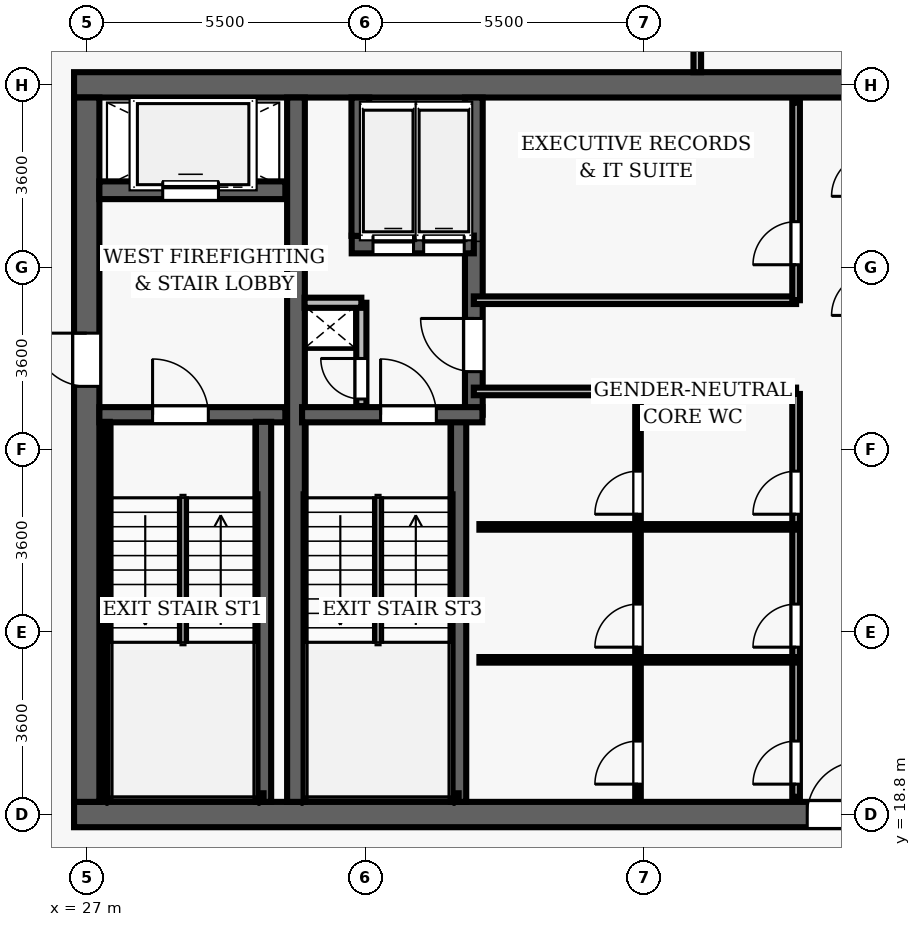
"""IFC4 building model, lengths in metres.
Left out: names, types, materials, properties, quantities, classifications, styles, units other than length and angle.
Written with IfcOpenShell. Run it as: python <this file> out.ifc"""

import sys

from ifc_helpers import new_model, si_unit, direction, frame, frame_2d, origin, place, context, subcontext, project, spatial, rectangle, extrude, element, fill, save


model = new_model("IFC4")
c1 = context("Model", 3, precision=1e-05, world=origin(), true_north=direction((0.0, 1.0)))
c2 = subcontext(c1, "Body", "Model", "MODEL_VIEW")
j1 = project(units=[si_unit("LENGTHUNIT", "METRE"), si_unit("PLANEANGLEUNIT", "RADIAN")], contexts=[c1])
p1 = place(None, origin())
s1 = spatial("IfcSite", under=j1, at=p1, CompositionType="ELEMENT")
p2 = place(p1, origin())
s2 = spatial("IfcBuilding", under=s1, at=p2, CompositionType="ELEMENT")
p3 = place(p2, frame((0.0, 0.0, 295.95)))
s3 = spatial("IfcBuildingStorey", under=s2, at=p3, CompositionType="ELEMENT", Elevation=295.95)
p4 = place(p3, frame((26.75, 18.8, 0.0), z_axis=(0.0, 0.0, 1.0), x_axis=(1.0, 0.0, 0.0)))
e1 = element("IfcWall", 1, at=p4, inside=s3, PredefinedType="SHEAR", context=c2, shape_type="SweptSolid", body=[
    extrude(rectangle(XDim=22.5, YDim=0.5, at=frame_2d((11.25, 0.0))), origin(), (0.0, 0.0, 1.0), 3.85),
])
p5 = place(p4, frame((14.47, 0.0, 0.0)))
e2 = element("IfcOpeningElement", 2, at=p5, cuts=e1, PredefinedType="OPENING", context=c2, shape_type="SweptSolid", body=[
    extrude(rectangle(XDim=1.05, YDim=2.15, at=frame_2d((0.525, 1.075))), frame((0.0, 0.26, 0.0), z_axis=(0.0, -1.0, 0.0), x_axis=(1.0, 0.0, 0.0)), (0.0, 0.0, 1.0), 0.52),
])
p6 = place(p3, frame((26.75, 33.2, 0.0), z_axis=(0.0, 0.0, 1.0), x_axis=(1.0, 0.0, 0.0)))
e3 = element("IfcWall", 3, at=p6, inside=s3, PredefinedType="SHEAR", context=c2, shape_type="SweptSolid", body=[
    extrude(rectangle(XDim=22.5, YDim=0.5, at=frame_2d((11.25, 0.0))), origin(), (0.0, 0.0, 1.0), 3.85),
])
p7 = place(p3, frame((27.0, 19.05, 0.0), z_axis=(0.0, 0.0, 1.0), x_axis=(0.0, 1.0, 0.0)))
e4 = element("IfcWall", 4, at=p7, inside=s3, PredefinedType="SHEAR", context=c2, shape_type="SweptSolid", body=[
    extrude(rectangle(XDim=13.9, YDim=0.5, at=frame_2d((6.95, 0.0))), origin(), (0.0, 0.0, 1.0), 3.85),
])
p8 = place(p7, frame((8.2, 0.0, 0.0)))
e5 = element("IfcOpeningElement", 5, at=p8, cuts=e4, PredefinedType="OPENING", context=c2, shape_type="SweptSolid", body=[
    extrude(rectangle(XDim=1.05, YDim=2.15, at=frame_2d((0.525, 1.075))), frame((0.0, 0.26, 0.0), z_axis=(0.0, -1.0, 0.0), x_axis=(1.0, 0.0, 0.0)), (0.0, 0.0, 1.0), 0.52),
])
p9 = place(p3, frame((31.13, 19.05, 0.0), z_axis=(0.0, 0.0, 1.0), x_axis=(0.0, 1.0, 0.0)))
e6 = element("IfcWall", 6, at=p9, inside=s3, PredefinedType="SHEAR", context=c2, shape_type="SweptSolid", body=[
    extrude(rectangle(XDim=13.9, YDim=0.35, at=frame_2d((6.95, 0.0))), origin(), (0.0, 0.0, 1.0), 3.85),
])
p10 = place(p3, frame((27.25, 26.69, 0.0), z_axis=(0.0, 0.0, 1.0), x_axis=(1.0, 0.0, 0.0)))
e7 = element("IfcWall", 7, at=p10, inside=s3, PredefinedType="SHEAR", context=c2, shape_type="SweptSolid", body=[
    extrude(rectangle(XDim=3.67, YDim=0.3, at=frame_2d((1.835, 0.0))), origin(), (0.0, 0.0, 1.0), 3.85),
])
p11 = place(p10, frame((1.05, 0.0, 0.0)))
e8 = element("IfcOpeningElement", 8, at=p11, cuts=e7, PredefinedType="OPENING", context=c2, shape_type="SweptSolid", body=[
    extrude(rectangle(XDim=1.1, YDim=2.15, at=frame_2d((0.55, 1.075))), frame((0.0, 0.16, 0.0), z_axis=(0.0, -1.0, 0.0), x_axis=(1.0, 0.0, 0.0)), (0.0, 0.0, 1.0), 0.32),
])
p12 = place(p3, frame((30.49, 19.05, 0.0), z_axis=(0.0, 0.0, 1.0), x_axis=(0.0, 1.0, 0.0)))
e9 = element("IfcWall", 9, at=p12, inside=s3, PredefinedType="SHEAR", context=c2, shape_type="SweptSolid", body=[
    extrude(rectangle(XDim=7.5, YDim=0.3, at=frame_2d((3.75, 0.0))), origin(), (0.0, 0.0, 1.0), 3.85),
])
p13 = place(p3, frame((27.395, 19.1, 0.0), z_axis=(0.0, 0.0, 1.0), x_axis=(0.0, 1.0, 0.0)))
e10 = element("IfcWall", 10, at=p13, inside=s3, PredefinedType="SHEAR", context=c2, shape_type="SweptSolid", body=[
    extrude(rectangle(XDim=7.45, YDim=0.12, at=frame_2d((3.725, 0.0))), origin(), (0.0, 0.0, 1.0), 3.85),
])
p14 = place(p3, frame((27.395, 19.16, 0.0), z_axis=(0.0, 0.0, 1.0), x_axis=(1.0, 0.0, 0.0)))
e11 = element("IfcWall", 11, at=p14, inside=s3, PredefinedType="SHEAR", context=c2, shape_type="SweptSolid", body=[
    extrude(rectangle(XDim=3.095, YDim=0.12, at=frame_2d((1.547, 0.0))), origin(), (0.0, 0.0, 1.0), 3.85),
])
p15 = place(p3, frame((27.25, 31.12, 0.0), z_axis=(0.0, 0.0, 1.0), x_axis=(1.0, 0.0, 0.0)))
e12 = element("IfcWall", 12, at=p15, inside=s3, PredefinedType="SHEAR", context=c2, shape_type="SweptSolid", body=[
    extrude(rectangle(XDim=3.67, YDim=0.35, at=frame_2d((1.835, 0.0))), origin(), (0.0, 0.0, 1.0), 3.04),
])
p16 = place(p15, frame((1.25, 0.0, 0.0)))
e13 = element("IfcOpeningElement", 13, at=p16, cuts=e12, PredefinedType="OPENING", context=c2, shape_type="SweptSolid", body=[
    extrude(rectangle(XDim=1.1, YDim=2.15, at=frame_2d((0.55, 1.075))), frame((0.0, 0.185, 0.0), z_axis=(0.0, -1.0, 0.0), x_axis=(1.0, 0.0, 0.0)), (0.0, 0.0, 1.0), 0.37),
])
p17 = place(p3, frame((34.34, 19.05, 0.0), z_axis=(0.0, 0.0, 1.0), x_axis=(0.0, 1.0, 0.0)))
e14 = element("IfcWall", 14, at=p17, inside=s3, PredefinedType="SHEAR", context=c2, shape_type="SweptSolid", body=[
    extrude(rectangle(XDim=7.5, YDim=0.3, at=frame_2d((3.75, 0.0))), origin(), (0.0, 0.0, 1.0), 3.85),
])
p18 = place(p3, frame((34.64, 26.69, 0.0), z_axis=(0.0, 0.0, 1.0), x_axis=(0.0, 1.0, 0.0)))
e15 = element("IfcWall", 15, at=p18, inside=s3, PredefinedType="SHEAR", context=c2, shape_type="SweptSolid", body=[
    extrude(rectangle(XDim=6.26, YDim=0.35, at=frame_2d((3.13, 0.0))), origin(), (0.0, 0.0, 1.0), 3.85),
])
p19 = place(p18, frame((0.85, 0.0, 0.0)))
e16 = element("IfcOpeningElement", 16, at=p19, cuts=e15, PredefinedType="OPENING", context=c2, shape_type="SweptSolid", body=[
    extrude(rectangle(XDim=1.05, YDim=2.15, at=frame_2d((0.525, 1.075))), frame((0.0, 0.185, 0.0), z_axis=(0.0, -1.0, 0.0), x_axis=(1.0, 0.0, 0.0)), (0.0, 0.0, 1.0), 0.37),
])
p20 = place(p3, frame((31.25, 26.69, 0.0), z_axis=(0.0, 0.0, 1.0), x_axis=(1.0, 0.0, 0.0)))
e17 = element("IfcWall", 17, at=p20, inside=s3, PredefinedType="SHEAR", context=c2, shape_type="SweptSolid", body=[
    extrude(rectangle(XDim=3.56, YDim=0.3, at=frame_2d((1.78, 0.0))), origin(), (0.0, 0.0, 1.0), 3.85),
])
p21 = place(p20, frame((1.55, 0.0, 0.0)))
e18 = element("IfcOpeningElement", 18, at=p21, cuts=e17, PredefinedType="OPENING", context=c2, shape_type="SweptSolid", body=[
    extrude(rectangle(XDim=1.1, YDim=2.15, at=frame_2d((0.55, 1.075))), frame((0.0, 0.16, 0.0), z_axis=(0.0, -1.0, 0.0), x_axis=(1.0, 0.0, 0.0)), (0.0, 0.0, 1.0), 0.32),
])
p22 = place(p3, frame((31.3, 19.16, 0.0), z_axis=(0.0, 0.0, 1.0), x_axis=(1.0, 0.0, 0.0)))
e19 = element("IfcWall", 19, at=p22, inside=s3, PredefinedType="SHEAR", context=c2, shape_type="SweptSolid", body=[
    extrude(rectangle(XDim=3.04, YDim=0.12, at=frame_2d((1.52, 0.0))), origin(), (0.0, 0.0, 1.0), 3.85),
])
p23 = place(p3, frame((32.23, 30.05, 0.0), z_axis=(0.0, 0.0, 1.0), x_axis=(1.0, 0.0, 0.0)))
e20 = element("IfcWall", 20, at=p23, inside=s3, PredefinedType="SHEAR", context=c2, shape_type="SweptSolid", body=[
    extrude(rectangle(XDim=2.41, YDim=0.35, at=frame_2d((1.205, 0.0))), origin(), (0.0, 0.0, 1.0), 3.04),
])
p24 = place(p23, frame((0.42, 0.0, 0.0)))
e21 = element("IfcOpeningElement", 21, at=p24, cuts=e20, PredefinedType="OPENING", context=c2, shape_type="SweptSolid", body=[
    extrude(rectangle(XDim=0.8, YDim=2.15, at=frame_2d((0.4, 1.075))), frame((0.0, 0.185, 0.0), z_axis=(0.0, -1.0, 0.0), x_axis=(1.0, 0.0, 0.0)), (0.0, 0.0, 1.0), 0.37),
])
p25 = place(p23, frame((1.42, 0.0, 0.0)))
e22 = element("IfcOpeningElement", 22, at=p25, cuts=e20, PredefinedType="OPENING", context=c2, shape_type="SweptSolid", body=[
    extrude(rectangle(XDim=0.8, YDim=2.15, at=frame_2d((0.4, 1.075))), frame((0.0, 0.185, 0.0), z_axis=(0.0, -1.0, 0.0), x_axis=(1.0, 0.0, 0.0)), (0.0, 0.0, 1.0), 0.37),
])
p26 = place(p3, frame((32.4, 30.22, 0.0), z_axis=(0.0, 0.0, 1.0), x_axis=(0.0, 1.0, 0.0)))
e23 = element("IfcWall", 23, at=p26, inside=s3, PredefinedType="SHEAR", context=c2, shape_type="SweptSolid", body=[
    extrude(rectangle(XDim=2.73, YDim=0.35, at=frame_2d((1.365, 0.0))), origin(), (0.0, 0.0, 1.0), 3.04),
])
p27 = place(p3, frame((32.42, 26.86, 0.0), z_axis=(0.0, 0.0, 1.0), x_axis=(0.0, 1.0, 0.0)))
e24 = element("IfcWall", 24, at=p27, inside=s3, PredefinedType="PARTITIONING", context=c2, shape_type="SweptSolid", body=[
    extrude(rectangle(XDim=2.04, YDim=0.2, at=frame_2d((1.02, 0.0))), origin(), (0.0, 0.0, 1.0), 3.04),
])
p28 = place(p27, frame((0.14, 0.0, 0.0)))
e25 = element("IfcOpeningElement", 25, at=p28, cuts=e24, PredefinedType="OPENING", context=c2, shape_type="SweptSolid", body=[
    extrude(rectangle(XDim=0.8, YDim=2.05, at=frame_2d((0.4, 1.025))), frame((0.0, 0.11, 0.0), z_axis=(0.0, -1.0, 0.0), x_axis=(1.0, 0.0, 0.0)), (0.0, 0.0, 1.0), 0.22),
])
p29 = place(p3, frame((31.3, 28.9, 0.0), z_axis=(0.0, 0.0, 1.0), x_axis=(1.0, 0.0, 0.0)))
e26 = element("IfcWall", 26, at=p29, inside=s3, PredefinedType="PARTITIONING", context=c2, shape_type="SweptSolid", body=[
    extrude(rectangle(XDim=1.12, YDim=0.2, at=frame_2d((0.56, 0.0))), origin(), (0.0, 0.0, 1.0), 3.04),
])
for number, where, z_axis, x_axis in (
    (27, (34.64, 27.15, 0.0), (0.0, 0.0, 1.0), (1.0, 0.0, 0.0)),
    (28, (34.64, 28.95, 0.0), (0.0, 0.0, 1.0), (1.0, 0.0, 0.0)),
):
    element("IfcWall", number, at=place(p3, frame(where, z_axis=z_axis, x_axis=x_axis)), inside=s3, PredefinedType="PARTITIONING", context=c2, shape_type="SweptSolid", body=[
        extrude(rectangle(XDim=6.36, YDim=0.15, at=frame_2d((3.18, 0.0))), origin(), (0.0, 0.0, 1.0), 3.04),
    ])
p30 = place(p3, frame((41.0, 28.95, 0.0), z_axis=(0.0, 0.0, 1.0), x_axis=(0.0, 1.0, 0.0)))
e29 = element("IfcWall", 29, at=p30, inside=s3, PredefinedType="PARTITIONING", context=c2, shape_type="SweptSolid", body=[
    extrude(rectangle(XDim=3.9, YDim=0.15, at=frame_2d((1.95, 0.0))), origin(), (0.0, 0.0, 1.0), 3.04),
])
p31 = place(p30, frame((0.7, 0.0, 0.0)))
e30 = element("IfcOpeningElement", 30, at=p31, cuts=e29, PredefinedType="OPENING", context=c2, shape_type="SweptSolid", body=[
    extrude(rectangle(XDim=0.85, YDim=2.1, at=frame_2d((0.425, 1.05))), frame((0.0, 0.085, 0.0), z_axis=(0.0, -1.0, 0.0), x_axis=(1.0, 0.0, 0.0)), (0.0, 0.0, 1.0), 0.17),
])
p32 = place(p3, frame((41.0, 19.15, 0.0), z_axis=(0.0, 0.0, 1.0), x_axis=(0.0, 1.0, 0.0)))
e31 = element("IfcWall", 31, at=p32, inside=s3, PredefinedType="PARTITIONING", context=c2, shape_type="SweptSolid", body=[
    extrude(rectangle(XDim=7.95, YDim=0.15, at=frame_2d((3.975, 0.0))), origin(), (0.0, 0.0, 1.0), 3.04),
])
p33 = place(p32, frame((0.25, 0.0, 0.0)))
e32 = element("IfcOpeningElement", 32, at=p33, cuts=e31, PredefinedType="OPENING", context=c2, shape_type="SweptSolid", body=[
    extrude(rectangle(XDim=0.85, YDim=2.1, at=frame_2d((0.425, 1.05))), frame((0.0, 0.085, 0.0), z_axis=(0.0, -1.0, 0.0), x_axis=(1.0, 0.0, 0.0)), (0.0, 0.0, 1.0), 0.17),
])
p34 = place(p32, frame((2.953, 0.0, 0.0)))
e33 = element("IfcOpeningElement", 33, at=p34, cuts=e31, PredefinedType="OPENING", context=c2, shape_type="SweptSolid", body=[
    extrude(rectangle(XDim=0.85, YDim=2.1, at=frame_2d((0.425, 1.05))), frame((0.0, 0.085, 0.0), z_axis=(0.0, -1.0, 0.0), x_axis=(1.0, 0.0, 0.0)), (0.0, 0.0, 1.0), 0.17),
])
p35 = place(p32, frame((5.576, 0.0, 0.0)))
e34 = element("IfcOpeningElement", 34, at=p35, cuts=e31, PredefinedType="OPENING", context=c2, shape_type="SweptSolid", body=[
    extrude(rectangle(XDim=0.85, YDim=2.1, at=frame_2d((0.425, 1.05))), frame((0.0, 0.085, 0.0), z_axis=(0.0, -1.0, 0.0), x_axis=(1.0, 0.0, 0.0)), (0.0, 0.0, 1.0), 0.17),
])
p36 = place(p3, frame((37.88, 19.15, 0.0), z_axis=(0.0, 0.0, 1.0), x_axis=(0.0, 1.0, 0.0)))
e35 = element("IfcWall", 35, at=p36, inside=s3, PredefinedType="PARTITIONING", context=c2, shape_type="SweptSolid", body=[
    extrude(rectangle(XDim=7.95, YDim=0.11, at=frame_2d((3.975, 0.0))), origin(), (0.0, 0.0, 1.0), 3.04),
])
p37 = place(p36, frame((0.25, 0.0, 0.0)))
e36 = element("IfcOpeningElement", 36, at=p37, cuts=e35, PredefinedType="OPENING", context=c2, shape_type="SweptSolid", body=[
    extrude(rectangle(XDim=0.85, YDim=2.1, at=frame_2d((0.425, 1.05))), frame((0.0, 0.065, 0.0), z_axis=(0.0, -1.0, 0.0), x_axis=(1.0, 0.0, 0.0)), (0.0, 0.0, 1.0), 0.13),
])
p38 = place(p36, frame((2.953, 0.0, 0.0)))
e37 = element("IfcOpeningElement", 37, at=p38, cuts=e35, PredefinedType="OPENING", context=c2, shape_type="SweptSolid", body=[
    extrude(rectangle(XDim=0.85, YDim=2.1, at=frame_2d((0.425, 1.05))), frame((0.0, 0.065, 0.0), z_axis=(0.0, -1.0, 0.0), x_axis=(1.0, 0.0, 0.0)), (0.0, 0.0, 1.0), 0.13),
])
p39 = place(p36, frame((5.576, 0.0, 0.0)))
e38 = element("IfcOpeningElement", 38, at=p39, cuts=e35, PredefinedType="OPENING", context=c2, shape_type="SweptSolid", body=[
    extrude(rectangle(XDim=0.85, YDim=2.1, at=frame_2d((0.425, 1.05))), frame((0.0, 0.065, 0.0), z_axis=(0.0, -1.0, 0.0), x_axis=(1.0, 0.0, 0.0)), (0.0, 0.0, 1.0), 0.13),
])
for number, where, z_axis, x_axis in (
    (39, (34.75, 21.853, 0.0), (0.0, 0.0, 1.0), (1.0, 0.0, 0.0)),
    (40, (34.75, 24.477, 0.0), (0.0, 0.0, 1.0), (1.0, 0.0, 0.0)),
):
    element("IfcWall", number, at=place(p3, frame(where, z_axis=z_axis, x_axis=x_axis)), inside=s3, PredefinedType="PARTITIONING", context=c2, shape_type="SweptSolid", body=[
        extrude(rectangle(XDim=6.25, YDim=0.11, at=frame_2d((3.125, 0.0))), origin(), (0.0, 0.0, 1.0), 3.04),
    ])
p40 = place(p3, frame((39.05, 33.45, 0.0), z_axis=(0.0, 0.0, 1.0), x_axis=(0.0, 1.0, 0.0)))
e41 = element("IfcWall", 41, at=p40, inside=s3, PredefinedType="PARTITIONING", context=c2, shape_type="SweptSolid", body=[
    extrude(rectangle(XDim=6.95, YDim=0.15, at=frame_2d((3.475, 0.0))), origin(), (0.0, 0.0, 1.0), 3.04),
])
p41 = place(p40, frame((0.988, 0.0, 0.0)))
e42 = element("IfcOpeningElement", 42, at=p41, cuts=e41, PredefinedType="OPENING", context=c2, shape_type="SweptSolid", body=[
    extrude(rectangle(XDim=1.5, YDim=2.2, at=frame_2d((0.75, 1.1))), frame((0.0, 0.085, 0.0), z_axis=(0.0, -1.0, 0.0), x_axis=(1.0, 0.0, 0.0)), (0.0, 0.0, 1.0), 0.17),
])
p42 = place(p11, origin())
e43 = element("IfcDoor", 43, at=p42, inside=s3, OperationType="SINGLE_SWING_LEFT", PredefinedType="DOOR", context=c2, shape_type="SweptSolid", body=[
    extrude(rectangle(XDim=1.1, YDim=2.15, at=frame_2d((0.55, 1.075))), frame((0.0, 0.025, 0.0), z_axis=(0.0, -1.0, 0.0), x_axis=(1.0, 0.0, 0.0)), (0.0, 0.0, 1.0), 0.05),
])
fill(e8, e43)
p43 = place(p8, origin())
e44 = element("IfcDoor", 44, at=p43, inside=s3, OperationType="SINGLE_SWING_RIGHT", PredefinedType="DOOR", context=c2, shape_type="SweptSolid", body=[
    extrude(rectangle(XDim=1.05, YDim=2.15, at=frame_2d((0.525, 1.075))), frame((0.0, 0.025, 0.0), z_axis=(0.0, -1.0, 0.0), x_axis=(1.0, 0.0, 0.0)), (0.0, 0.0, 1.0), 0.05),
])
fill(e5, e44)
p44 = place(p21, origin())
e45 = element("IfcDoor", 45, at=p44, inside=s3, OperationType="SINGLE_SWING_LEFT", PredefinedType="DOOR", context=c2, shape_type="SweptSolid", body=[
    extrude(rectangle(XDim=1.1, YDim=2.15, at=frame_2d((0.55, 1.075))), frame((0.0, 0.025, 0.0), z_axis=(0.0, -1.0, 0.0), x_axis=(1.0, 0.0, 0.0)), (0.0, 0.0, 1.0), 0.05),
])
fill(e18, e45)
p45 = place(p28, origin())
e46 = element("IfcDoor", 46, at=p45, inside=s3, OperationType="SINGLE_SWING_RIGHT", PredefinedType="DOOR", context=c2, shape_type="SweptSolid", body=[
    extrude(rectangle(XDim=0.8, YDim=2.05, at=frame_2d((0.4, 1.025))), frame((0.0, 0.025, 0.0), z_axis=(0.0, -1.0, 0.0), x_axis=(1.0, 0.0, 0.0)), (0.0, 0.0, 1.0), 0.05),
])
fill(e25, e46)
p46 = place(p5, origin())
e47 = element("IfcDoor", 47, at=p46, inside=s3, OperationType="SINGLE_SWING_RIGHT", PredefinedType="DOOR", context=c2, shape_type="SweptSolid", body=[
    extrude(rectangle(XDim=1.05, YDim=2.15, at=frame_2d((0.525, 1.075))), frame((0.0, 0.025, 0.0), z_axis=(0.0, -1.0, 0.0), x_axis=(1.0, 0.0, 0.0)), (0.0, 0.0, 1.0), 0.05),
])
fill(e2, e47)
p47 = place(p19, origin())
e48 = element("IfcDoor", 48, at=p47, inside=s3, OperationType="SINGLE_SWING_RIGHT", PredefinedType="DOOR", context=c2, shape_type="SweptSolid", body=[
    extrude(rectangle(XDim=1.05, YDim=2.15, at=frame_2d((0.525, 1.075))), frame((0.0, 0.025, 0.0), z_axis=(0.0, -1.0, 0.0), x_axis=(1.0, 0.0, 0.0)), (0.0, 0.0, 1.0), 0.05),
])
fill(e16, e48)
p48 = place(p31, origin())
e49 = element("IfcDoor", 49, at=p48, inside=s3, OperationType="SINGLE_SWING_LEFT", PredefinedType="DOOR", context=c2, shape_type="SweptSolid", body=[
    extrude(rectangle(XDim=0.85, YDim=2.1, at=frame_2d((0.425, 1.05))), frame((0.0, 0.025, 0.0), z_axis=(0.0, -1.0, 0.0), x_axis=(1.0, 0.0, 0.0)), (0.0, 0.0, 1.0), 0.05),
])
fill(e30, e49)
p49 = place(p33, origin())
e50 = element("IfcDoor", 50, at=p49, inside=s3, OperationType="SINGLE_SWING_LEFT", PredefinedType="DOOR", context=c2, shape_type="SweptSolid", body=[
    extrude(rectangle(XDim=0.85, YDim=2.1, at=frame_2d((0.425, 1.05))), frame((0.0, 0.025, 0.0), z_axis=(0.0, -1.0, 0.0), x_axis=(1.0, 0.0, 0.0)), (0.0, 0.0, 1.0), 0.05),
])
fill(e32, e50)
p50 = place(p37, origin())
e51 = element("IfcDoor", 51, at=p50, inside=s3, OperationType="SINGLE_SWING_LEFT", PredefinedType="DOOR", context=c2, shape_type="SweptSolid", body=[
    extrude(rectangle(XDim=0.85, YDim=2.1, at=frame_2d((0.425, 1.05))), frame((0.0, 0.025, 0.0), z_axis=(0.0, -1.0, 0.0), x_axis=(1.0, 0.0, 0.0)), (0.0, 0.0, 1.0), 0.05),
])
fill(e36, e51)
p51 = place(p34, origin())
e52 = element("IfcDoor", 52, at=p51, inside=s3, OperationType="SINGLE_SWING_LEFT", PredefinedType="DOOR", context=c2, shape_type="SweptSolid", body=[
    extrude(rectangle(XDim=0.85, YDim=2.1, at=frame_2d((0.425, 1.05))), frame((0.0, 0.025, 0.0), z_axis=(0.0, -1.0, 0.0), x_axis=(1.0, 0.0, 0.0)), (0.0, 0.0, 1.0), 0.05),
])
fill(e33, e52)
p52 = place(p38, origin())
e53 = element("IfcDoor", 53, at=p52, inside=s3, OperationType="SINGLE_SWING_LEFT", PredefinedType="DOOR", context=c2, shape_type="SweptSolid", body=[
    extrude(rectangle(XDim=0.85, YDim=2.1, at=frame_2d((0.425, 1.05))), frame((0.0, 0.025, 0.0), z_axis=(0.0, -1.0, 0.0), x_axis=(1.0, 0.0, 0.0)), (0.0, 0.0, 1.0), 0.05),
])
fill(e37, e53)
p53 = place(p35, origin())
e54 = element("IfcDoor", 54, at=p53, inside=s3, OperationType="SINGLE_SWING_LEFT", PredefinedType="DOOR", context=c2, shape_type="SweptSolid", body=[
    extrude(rectangle(XDim=0.85, YDim=2.1, at=frame_2d((0.425, 1.05))), frame((0.0, 0.025, 0.0), z_axis=(0.0, -1.0, 0.0), x_axis=(1.0, 0.0, 0.0)), (0.0, 0.0, 1.0), 0.05),
])
fill(e34, e54)
p54 = place(p39, origin())
e55 = element("IfcDoor", 55, at=p54, inside=s3, OperationType="SINGLE_SWING_LEFT", PredefinedType="DOOR", context=c2, shape_type="SweptSolid", body=[
    extrude(rectangle(XDim=0.85, YDim=2.1, at=frame_2d((0.425, 1.05))), frame((0.0, 0.025, 0.0), z_axis=(0.0, -1.0, 0.0), x_axis=(1.0, 0.0, 0.0)), (0.0, 0.0, 1.0), 0.05),
])
fill(e38, e55)
p55 = place(p16, origin())
e56 = element("IfcDoor", 56, at=p55, inside=s3, OperationType="SLIDING_TO_LEFT", PredefinedType="DOOR", context=c2, shape_type="SweptSolid", body=[
    extrude(rectangle(XDim=1.1, YDim=2.15, at=frame_2d((0.55, 1.075))), frame((0.0, 0.025, 0.0), z_axis=(0.0, -1.0, 0.0), x_axis=(1.0, 0.0, 0.0)), (0.0, 0.0, 1.0), 0.05),
])
fill(e13, e56)
p56 = place(p24, origin())
e57 = element("IfcDoor", 57, at=p56, inside=s3, OperationType="SLIDING_TO_LEFT", PredefinedType="DOOR", context=c2, shape_type="SweptSolid", body=[
    extrude(rectangle(XDim=0.8, YDim=2.15, at=frame_2d((0.4, 1.075))), frame((0.0, 0.025, 0.0), z_axis=(0.0, -1.0, 0.0), x_axis=(1.0, 0.0, 0.0)), (0.0, 0.0, 1.0), 0.05),
])
fill(e21, e57)
p57 = place(p25, origin())
e58 = element("IfcDoor", 58, at=p57, inside=s3, OperationType="SLIDING_TO_LEFT", PredefinedType="DOOR", context=c2, shape_type="SweptSolid", body=[
    extrude(rectangle(XDim=0.8, YDim=2.15, at=frame_2d((0.4, 1.075))), frame((0.0, 0.025, 0.0), z_axis=(0.0, -1.0, 0.0), x_axis=(1.0, 0.0, 0.0)), (0.0, 0.0, 1.0), 0.05),
])
fill(e22, e58)
save(model, sys.argv[1])
